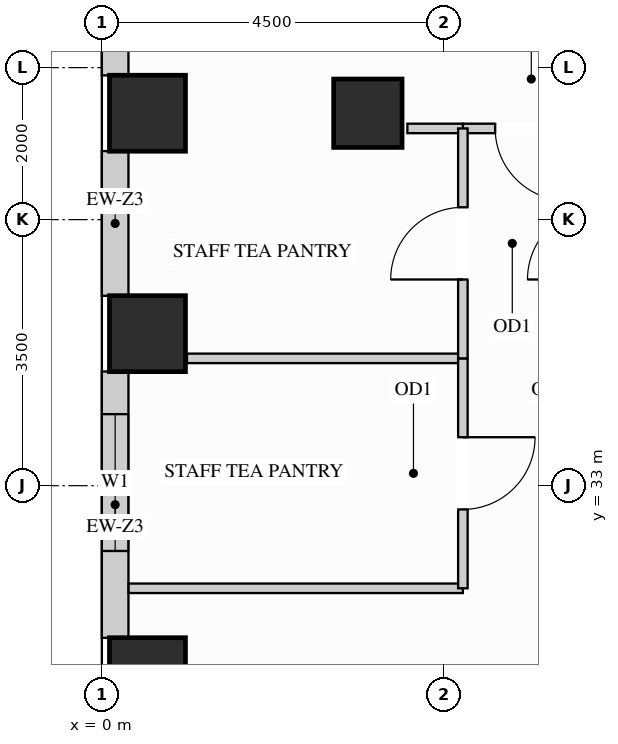
"""IFC4 building model, lengths in metres.
Left out: names, types, materials, properties, quantities, classifications, styles, units other than length and angle.
Written with IfcOpenShell. Run it as: python <this file> out.ifc"""

import sys

from ifc_helpers import new_model, si_unit, direction, frame, frame_2d, origin, origin_2d, place, context, subcontext, project, spatial, rectangle, extrude, source, transform, mapped, element, fill, save


model = new_model("IFC4")
c1 = context("Model", 3, precision=1e-05, world=origin(), true_north=direction((0.0, 1.0)))
c2 = subcontext(c1, "Body", "Model", "MODEL_VIEW")
j1 = project(units=[si_unit("LENGTHUNIT", "METRE"), si_unit("PLANEANGLEUNIT", "RADIAN")], contexts=[c1])
p1 = place(None, origin())
s1 = spatial("IfcSite", under=j1, at=p1, CompositionType="ELEMENT")
p2 = place(p1, origin())
s2 = spatial("IfcBuilding", under=s1, at=p2, CompositionType="ELEMENT")
p3 = place(p2, frame((0.0, 0.0, 193.5)))
s3 = spatial("IfcBuildingStorey", under=s2, at=p3, CompositionType="ELEMENT", Elevation=193.5)
m1 = source(origin(), c2, "Body", "SweptSolid", [
    extrude(rectangle(XDim=0.9, YDim=0.9, at=origin_2d()), origin(), (0.0, 0.0, 1.0), 3.4),
])
p4 = place(p3, frame((3.5, 37.9, 0.0), z_axis=(0.0, 0.0, 1.0), x_axis=(1.0, 0.0, 0.0)))
e1 = element("IfcColumn", 1, at=p4, inside=s3, PredefinedType="COLUMN", context=c2, shape_type="MappedRepresentation", body=[
    mapped(m1, transform((0.0, 0.0, 0.0), x_axis=(1.0, 0.0, 0.0), y_axis=(0.0, 1.0, 0.0), z_axis=(0.0, 0.0, 1.0))),
])
m2 = source(origin(), c2, "Body", "SweptSolid", [
    extrude(rectangle(XDim=1.0, YDim=1.0, at=origin_2d()), origin(), (0.0, 0.0, 1.0), 3.4),
])
for number, where, z_axis, x_axis in (
    (2, (0.6, 30.5, 0.0), (0.0, 0.0, 1.0), (1.0, 0.0, 0.0)),
    (3, (0.6, 35.0, 0.0), (0.0, 0.0, 1.0), (1.0, 0.0, 0.0)),
    (4, (0.6, 37.9, 0.0), (0.0, 0.0, 1.0), (1.0, 0.0, 0.0)),
):
    element("IfcColumn", number, at=place(p3, frame(where, z_axis=z_axis, x_axis=x_axis)), inside=s3, PredefinedType="COLUMN", context=c2, shape_type="MappedRepresentation", body=[
        mapped(m2, transform((0.0, 0.0, 0.0), x_axis=(1.0, 0.0, 0.0), y_axis=(0.0, 1.0, 0.0), z_axis=(0.0, 0.0, 1.0))),
    ])
m3 = source(origin(), c2, "Body", "SweptSolid", [
    extrude(rectangle(XDim=0.754, YDim=0.35, at=frame_2d((0.377, 0.0))), origin(), (0.0, 0.0, 1.0), 3.385),
])
p5 = place(p3, frame((0.175, 39.152, 0.0), z_axis=(0.0, 0.0, 1.0), x_axis=(0.0, -1.0, 0.0)))
e5 = element("IfcWall", 5, at=p5, inside=s3, PredefinedType="SOLIDWALL", context=c2, shape_type="MappedRepresentation", body=[
    mapped(m3, transform((0.0, 0.0, 0.0), x_axis=(1.0, 0.0, 0.0), y_axis=(0.0, 1.0, 0.0), z_axis=(0.0, 0.0, 1.0))),
])
m4 = source(origin(), c2, "Body", "SweptSolid", [
    extrude(rectangle(XDim=1.904, YDim=0.35, at=frame_2d((0.952, 0.0))), origin(), (0.0, 0.0, 1.0), 2.612),
])
p6 = place(p3, frame((0.175, 37.402, 0.0), z_axis=(0.0, 0.0, 1.0), x_axis=(0.0, -1.0, 0.0)))
e6 = element("IfcWall", 6, at=p6, inside=s3, PredefinedType="SOLIDWALL", context=c2, shape_type="MappedRepresentation", body=[
    mapped(m4, transform((0.0, 0.0, 0.0), x_axis=(1.0, 0.0, 0.0), y_axis=(0.0, 1.0, 0.0), z_axis=(0.0, 0.0, 1.0))),
])
p7 = place(p3, frame((0.175, 34.502, 0.0), z_axis=(0.0, 0.0, 1.0), x_axis=(0.0, -1.0, 0.0)))
e7 = element("IfcWall", 7, at=p7, inside=s3, PredefinedType="SOLIDWALL", context=c2, shape_type="SweptSolid", body=[
    extrude(rectangle(XDim=3.504, YDim=0.35, at=frame_2d((1.752, 0.0))), origin(), (0.0, 0.0, 1.0), 2.612),
])
p8 = place(p7, frame((0.561, 0.0, 0.78)))
e8 = element("IfcOpeningElement", 8, at=p8, cuts=e7, PredefinedType="OPENING", context=c2, shape_type="SweptSolid", body=[
    extrude(rectangle(XDim=1.8, YDim=1.652, at=frame_2d((0.9, 0.826))), frame((0.0, 0.185, 0.0), z_axis=(0.0, -1.0, 0.0), x_axis=(1.0, 0.0, 0.0)), (0.0, 0.0, 1.0), 0.37),
])
m5 = source(origin(), c2, "Body", "SweptSolid", [
    extrude(rectangle(XDim=4.398, YDim=0.125, at=frame_2d((2.199, 0.0))), origin(), (0.0, 0.0, 1.0), 2.848),
])
p9 = place(p3, frame((0.352, 31.65, 0.0), z_axis=(0.0, 0.0, 1.0), x_axis=(1.0, 0.0, 0.0)))
e9 = element("IfcWall", 9, at=p9, inside=s3, PredefinedType="PARTITIONING", context=c2, shape_type="MappedRepresentation", body=[
    mapped(m5, transform((0.0, 0.0, 0.0), x_axis=(1.0, 0.0, 0.0), y_axis=(0.0, 1.0, 0.0), z_axis=(0.0, 0.0, 1.0))),
])
m6 = source(origin(), c2, "Body", "SweptSolid", [
    extrude(rectangle(XDim=3.63, YDim=0.125, at=frame_2d((1.815, 0.0))), origin(), (0.0, 0.0, 1.0), 3.385),
])
p10 = place(p3, frame((1.12, 34.675, 0.0), z_axis=(0.0, 0.0, 1.0), x_axis=(1.0, 0.0, 0.0)))
e10 = element("IfcWall", 10, at=p10, inside=s3, PredefinedType="PARTITIONING", context=c2, shape_type="MappedRepresentation", body=[
    mapped(m6, transform((0.0, 0.0, 0.0), x_axis=(1.0, 0.0, 0.0), y_axis=(0.0, 1.0, 0.0), z_axis=(0.0, 0.0, 1.0))),
])
p11 = place(p3, frame((4.75, 37.7, 0.0), z_axis=(0.0, 0.0, 1.0), x_axis=(1.0, 0.0, 0.0)))
e11 = element("IfcWall", 11, at=p11, inside=s3, PredefinedType="PARTITIONING", context=c2, shape_type="SweptSolid", body=[
    extrude(rectangle(XDim=1.8, YDim=0.125, at=frame_2d((0.9, 0.0))), origin(), (0.0, 0.0, 1.0), 2.773),
])
p12 = place(p11, frame((0.425, 0.0, 0.0)))
e12 = element("IfcOpeningElement", 12, at=p12, cuts=e11, PredefinedType="OPENING", context=c2, shape_type="SweptSolid", body=[
    extrude(rectangle(XDim=0.95, YDim=2.15, at=frame_2d((0.475, 1.075))), frame((0.0, 0.073, 0.0), z_axis=(0.0, -1.0, 0.0), x_axis=(1.0, 0.0, 0.0)), (0.0, 0.0, 1.0), 0.145),
])
m7 = source(origin(), c2, "Body", "SweptSolid", [
    extrude(rectangle(XDim=0.73, YDim=0.125, at=frame_2d((0.365, 0.0))), origin(), (0.0, 0.0, 1.0), 2.773),
])
p13 = place(p3, frame((4.02, 37.7, 0.0), z_axis=(0.0, 0.0, 1.0), x_axis=(1.0, 0.0, 0.0)))
e13 = element("IfcWall", 13, at=p13, inside=s3, PredefinedType="PARTITIONING", context=c2, shape_type="MappedRepresentation", body=[
    mapped(m7, transform((0.0, 0.0, 0.0), x_axis=(1.0, 0.0, 0.0), y_axis=(0.0, 1.0, 0.0), z_axis=(0.0, 0.0, 1.0))),
])
p14 = place(p3, frame((4.75, 31.65, 0.0), z_axis=(0.0, 0.0, 1.0), x_axis=(0.0, 1.0, 0.0)))
e14 = element("IfcWall", 14, at=p14, inside=s3, PredefinedType="PARTITIONING", context=c2, shape_type="SweptSolid", body=[
    extrude(rectangle(XDim=3.025, YDim=0.125, at=frame_2d((1.513, 0.0))), origin(), (0.0, 0.0, 1.0), 3.385),
])
p15 = place(p14, frame((1.038, 0.0, 0.0)))
e15 = element("IfcOpeningElement", 15, at=p15, cuts=e14, PredefinedType="OPENING", context=c2, shape_type="SweptSolid", body=[
    extrude(rectangle(XDim=0.95, YDim=2.15, at=frame_2d((0.475, 1.075))), frame((0.0, 0.073, 0.0), z_axis=(0.0, -1.0, 0.0), x_axis=(1.0, 0.0, 0.0)), (0.0, 0.0, 1.0), 0.145),
])
p16 = place(p3, frame((4.75, 34.675, 0.0), z_axis=(0.0, 0.0, 1.0), x_axis=(0.0, 1.0, 0.0)))
e16 = element("IfcWall", 16, at=p16, inside=s3, PredefinedType="PARTITIONING", context=c2, shape_type="SweptSolid", body=[
    extrude(rectangle(XDim=3.025, YDim=0.125, at=frame_2d((1.512, 0.0))), origin(), (0.0, 0.0, 1.0), 3.385),
])
p17 = place(p16, frame((1.038, 0.0, 0.0)))
e17 = element("IfcOpeningElement", 17, at=p17, cuts=e16, PredefinedType="OPENING", context=c2, shape_type="SweptSolid", body=[
    extrude(rectangle(XDim=0.95, YDim=2.15, at=frame_2d((0.475, 1.075))), frame((0.0, 0.073, 0.0), z_axis=(0.0, -1.0, 0.0), x_axis=(1.0, 0.0, 0.0)), (0.0, 0.0, 1.0), 0.145),
])
m8 = source(origin(), c2, "Body", "SweptSolid", [
    extrude(rectangle(XDim=0.95, YDim=2.15, at=frame_2d((0.475, 1.075))), frame((0.0, 0.025, 0.0), z_axis=(0.0, -1.0, 0.0), x_axis=(1.0, 0.0, 0.0)), (0.0, 0.0, 1.0), 0.05),
])
p18 = place(p12, origin())
e18 = element("IfcDoor", 18, at=p18, inside=s3, OperationType="SINGLE_SWING_RIGHT", PredefinedType="DOOR", context=c2, shape_type="MappedRepresentation", body=[
    mapped(m8, transform((0.0, 0.0, 0.0), x_axis=(1.0, 0.0, 0.0), y_axis=(0.0, 1.0, 0.0), z_axis=(0.0, 0.0, 1.0))),
])
fill(e12, e18)
p19 = place(p15, origin())
e19 = element("IfcDoor", 19, at=p19, inside=s3, OperationType="SINGLE_SWING_RIGHT", PredefinedType="DOOR", context=c2, shape_type="MappedRepresentation", body=[
    mapped(m8, transform((0.0, 0.0, 0.0), x_axis=(1.0, 0.0, 0.0), y_axis=(0.0, 1.0, 0.0), z_axis=(0.0, 0.0, 1.0))),
])
fill(e15, e19)
p20 = place(p17, origin())
e20 = element("IfcDoor", 20, at=p20, inside=s3, OperationType="SINGLE_SWING_LEFT", PredefinedType="DOOR", context=c2, shape_type="MappedRepresentation", body=[
    mapped(m8, transform((0.0, 0.0, 0.0), x_axis=(1.0, 0.0, 0.0), y_axis=(0.0, 1.0, 0.0), z_axis=(0.0, 0.0, 1.0))),
])
fill(e17, e20)
m9 = source(origin(), c2, "Body", "SweptSolid", [
    extrude(rectangle(XDim=1.8, YDim=1.652, at=frame_2d((0.9, 0.826))), frame((0.0, 0.03, 0.0), z_axis=(0.0, -1.0, 0.0), x_axis=(1.0, 0.0, 0.0)), (0.0, 0.0, 1.0), 0.06),
])
p21 = place(p8, origin())
e21 = element("IfcWindow", 21, at=p21, inside=s3, PartitioningType="SINGLE_PANEL", PredefinedType="WINDOW", context=c2, shape_type="MappedRepresentation", body=[
    mapped(m9, transform((0.0, 0.0, 0.0), x_axis=(1.0, 0.0, 0.0), y_axis=(0.0, 1.0, 0.0), z_axis=(0.0, 0.0, 1.0))),
])
fill(e8, e21)
save(model, sys.argv[1])
